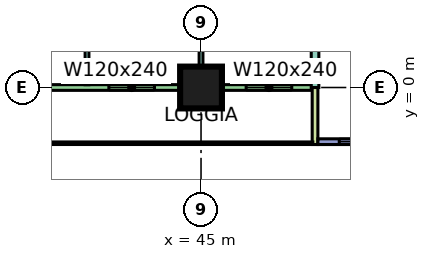
"""IFC4 building model, lengths in metres.
Left out: names, types, materials, properties, quantities, classifications, styles, units other than length and angle.
Written with IfcOpenShell. Run it as: python <this file> out.ifc"""

import sys

from ifc_helpers import new_model, si_unit, direction, frame, frame_2d, origin, origin_2d, place, context, subcontext, project, spatial, rectangle, extrude, element, fill, save


model = new_model("IFC4")
c1 = context("Model", 3, precision=1e-05, world=origin(), true_north=direction((0.0, 1.0)))
c2 = subcontext(c1, "Body", "Model", "MODEL_VIEW")
j1 = project(units=[si_unit("LENGTHUNIT", "METRE"), si_unit("PLANEANGLEUNIT", "RADIAN")], contexts=[c1])
p1 = place(None, origin())
s1 = spatial("IfcSite", under=j1, at=p1, CompositionType="ELEMENT")
p2 = place(p1, origin())
s2 = spatial("IfcBuilding", under=s1, at=p2, CompositionType="ELEMENT")
p3 = place(p2, frame((0.0, 0.0, 56.4)))
s3 = spatial("IfcBuildingStorey", under=s2, at=p3, CompositionType="ELEMENT", Elevation=56.4)
p4 = place(p3, frame((45.0, 0.0, 0.0), z_axis=(0.0, 0.0, 1.0), x_axis=(1.0, 0.0, 0.0)))
e1 = element("IfcColumn", 1, at=p4, inside=s3, PredefinedType="COLUMN", context=c2, shape_type="SweptSolid", body=[
    extrude(rectangle(XDim=1.1, YDim=1.1, at=origin_2d()), origin(), (0.0, 0.0, 1.0), 3.75),
])
p5 = place(p3, frame((36.075, 0.0, 0.0), z_axis=(0.0, 0.0, 1.0), x_axis=(1.0, 0.0, 0.0)))
e2 = element("IfcWall", 2, at=p5, inside=s3, PredefinedType="SOLIDWALL", context=c2, shape_type="SweptSolid", body=[
    extrude(rectangle(XDim=11.85, YDim=0.15, at=frame_2d((5.925, 0.0))), origin(), (0.0, 0.0, 1.0), 3.35),
])
p6 = place(p5, frame((2.35, 0.0, 0.0)))
e3 = element("IfcOpeningElement", 3, at=p6, cuts=e2, PredefinedType="OPENING", context=c2, shape_type="SweptSolid", body=[
    extrude(rectangle(XDim=1.8, YDim=2.4, at=frame_2d((0.9, 1.2))), frame((0.0, 0.085, 0.0), z_axis=(0.0, -1.0, 0.0), x_axis=(1.0, 0.0, 0.0)), (0.0, 0.0, 1.0), 0.17),
])
p7 = place(p5, frame((6.5, 0.0, 0.45)))
e4 = element("IfcOpeningElement", 4, at=p7, cuts=e2, PredefinedType="OPENING", context=c2, shape_type="SweptSolid", body=[
    extrude(rectangle(XDim=1.2, YDim=2.4, at=frame_2d((0.6, 1.2))), frame((0.0, 0.085, 0.0), z_axis=(0.0, -1.0, 0.0), x_axis=(1.0, 0.0, 0.0)), (0.0, 0.0, 1.0), 0.17),
])
p8 = place(p5, frame((10.113, 0.0, 0.45)))
e5 = element("IfcOpeningElement", 5, at=p8, cuts=e2, PredefinedType="OPENING", context=c2, shape_type="SweptSolid", body=[
    extrude(rectangle(XDim=1.2, YDim=2.4, at=frame_2d((0.6, 1.2))), frame((0.0, 0.085, 0.0), z_axis=(0.0, -1.0, 0.0), x_axis=(1.0, 0.0, 0.0)), (0.0, 0.0, 1.0), 0.17),
])
p9 = place(p3, frame((48.0, -1.5, 0.0), z_axis=(0.0, 0.0, 1.0), x_axis=(0.0, 1.0, 0.0)))
e6 = element("IfcWall", 6, at=p9, inside=s3, PredefinedType="SOLIDWALL", context=c2, shape_type="SweptSolid", body=[
    extrude(rectangle(XDim=1.5, YDim=0.15, at=frame_2d((0.75, 0.0))), origin(), (0.0, 0.0, 1.0), 3.35),
])
p10 = place(p3, frame((48.075, -1.425, 0.0), z_axis=(0.0, 0.0, 1.0), x_axis=(1.0, 0.0, 0.0)))
e7 = element("IfcWall", 7, at=p10, inside=s3, PredefinedType="SOLIDWALL", context=c2, shape_type="SweptSolid", body=[
    extrude(rectangle(XDim=11.85, YDim=0.15, at=frame_2d((5.925, 0.0))), origin(), (0.0, 0.0, 1.0), 3.35),
])
p11 = place(p10, frame((0.562, 0.0, 0.45)))
e8 = element("IfcOpeningElement", 8, at=p11, cuts=e7, PredefinedType="OPENING", context=c2, shape_type="SweptSolid", body=[
    extrude(rectangle(XDim=1.8, YDim=2.4, at=frame_2d((0.9, 1.2))), frame((0.0, 0.085, 0.0), z_axis=(0.0, -1.0, 0.0), x_axis=(1.0, 0.0, 0.0)), (0.0, 0.0, 1.0), 0.17),
])
p12 = place(p10, frame((3.525, 0.0, 0.45)))
e9 = element("IfcOpeningElement", 9, at=p12, cuts=e7, PredefinedType="OPENING", context=c2, shape_type="SweptSolid", body=[
    extrude(rectangle(XDim=4.8, YDim=2.4, at=frame_2d((2.4, 1.2))), frame((0.0, 0.085, 0.0), z_axis=(0.0, -1.0, 0.0), x_axis=(1.0, 0.0, 0.0)), (0.0, 0.0, 1.0), 0.17),
])
p13 = place(p10, frame((9.488, 0.0, 0.45)))
e10 = element("IfcOpeningElement", 10, at=p13, cuts=e7, PredefinedType="OPENING", context=c2, shape_type="SweptSolid", body=[
    extrude(rectangle(XDim=1.8, YDim=2.4, at=frame_2d((0.9, 1.2))), frame((0.0, 0.085, 0.0), z_axis=(0.0, -1.0, 0.0), x_axis=(1.0, 0.0, 0.0)), (0.0, 0.0, 1.0), 0.17),
])
for number, where, z_axis, x_axis in (
    (11, (42.0, 0.074, 0.0), (0.0, 0.0, 1.0), (0.0, 1.0, 0.0)),
    (12, (45.0, 0.074, 0.0), (0.0, 0.0, 1.0), (0.0, 1.0, 0.0)),
):
    element("IfcWall", number, at=place(p3, frame(where, z_axis=z_axis, x_axis=x_axis)), inside=s3, PredefinedType="PARTITIONING", context=c2, shape_type="SweptSolid", body=[
        extrude(rectangle(XDim=4.576, YDim=0.1, at=frame_2d((2.288, 0.0))), origin(), (0.0, 0.0, 1.0), 3.35),
    ])
p14 = place(p3, frame((48.0, 0.0, 0.0), z_axis=(0.0, 0.0, 1.0), x_axis=(0.0, 1.0, 0.0)))
e13 = element("IfcWall", 13, at=p14, inside=s3, PredefinedType="PARTITIONING", context=c2, shape_type="SweptSolid", body=[
    extrude(rectangle(XDim=5.975, YDim=0.2, at=frame_2d((2.988, 0.0))), origin(), (0.0, 0.0, 1.0), 3.35),
])
p15 = place(p7, origin())
e14 = element("IfcWindow", 14, at=p15, inside=s3, PartitioningType="SINGLE_PANEL", PredefinedType="WINDOW", context=c2, shape_type="SweptSolid", body=[
    extrude(rectangle(XDim=1.2, YDim=2.4, at=frame_2d((0.6, 1.2))), frame((0.0, 0.03, 0.0), z_axis=(0.0, -1.0, 0.0), x_axis=(1.0, 0.0, 0.0)), (0.0, 0.0, 1.0), 0.06),
])
fill(e4, e14)
p16 = place(p8, origin())
e15 = element("IfcWindow", 15, at=p16, inside=s3, PartitioningType="SINGLE_PANEL", PredefinedType="WINDOW", context=c2, shape_type="SweptSolid", body=[
    extrude(rectangle(XDim=1.2, YDim=2.4, at=frame_2d((0.6, 1.2))), frame((0.0, 0.03, 0.0), z_axis=(0.0, -1.0, 0.0), x_axis=(1.0, 0.0, 0.0)), (0.0, 0.0, 1.0), 0.06),
])
fill(e5, e15)
p17 = place(p11, origin())
e16 = element("IfcWindow", 16, at=p17, inside=s3, PartitioningType="SINGLE_PANEL", PredefinedType="WINDOW", context=c2, shape_type="SweptSolid", body=[
    extrude(rectangle(XDim=1.8, YDim=2.4, at=frame_2d((0.9, 1.2))), frame((0.0, 0.03, 0.0), z_axis=(0.0, -1.0, 0.0), x_axis=(1.0, 0.0, 0.0)), (0.0, 0.0, 1.0), 0.06),
])
fill(e8, e16)
save(model, sys.argv[1])
